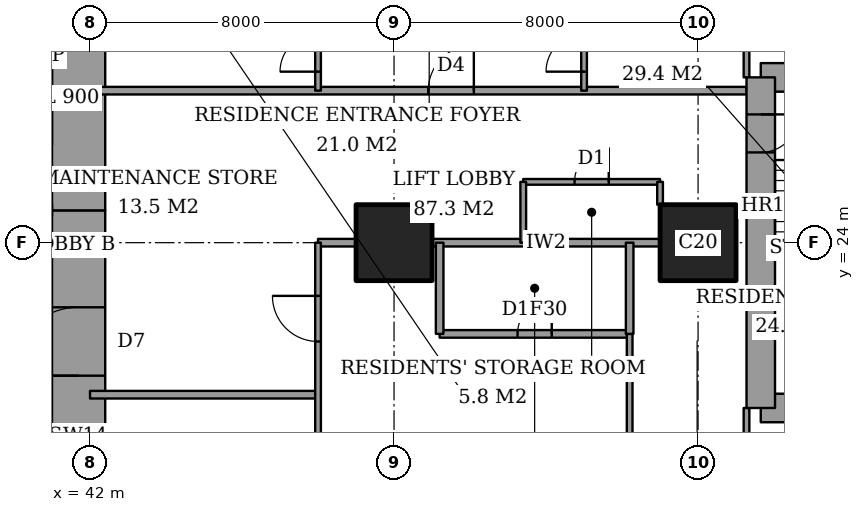
"""IFC4 building model, lengths in metres.
Left out: names, types, materials, properties, quantities, classifications, styles, units other than length and angle.
Written with IfcOpenShell. Run it as: python <this file> out.ifc"""

import sys

from ifc_helpers import new_model, si_unit, direction, frame, frame_2d, origin, origin_2d, place, context, subcontext, project, spatial, rectangle, extrude, element, fill, save


model = new_model("IFC4")
c1 = context("Model", 3, precision=1e-05, world=origin(), true_north=direction((0.0, 1.0)))
c2 = subcontext(c1, "Body", "Model", "MODEL_VIEW")
j1 = project(units=[si_unit("LENGTHUNIT", "METRE"), si_unit("PLANEANGLEUNIT", "RADIAN")], contexts=[c1])
p1 = place(None, origin())
s1 = spatial("IfcSite", under=j1, at=p1, CompositionType="ELEMENT")
p2 = place(p1, origin())
s2 = spatial("IfcBuilding", under=s1, at=p2, CompositionType="ELEMENT")
p3 = place(p2, frame((0.0, 0.0, 29.6)))
s3 = spatial("IfcBuildingStorey", under=s2, at=p3, CompositionType="ELEMENT", Elevation=29.6)
for number, where, z_axis, x_axis in (
    (1, (50.0, 24.0, 0.0), (0.0, 0.0, 1.0), (1.0, 0.0, 0.0)),
    (2, (58.0, 24.0, 0.0), (0.0, 0.0, 1.0), (1.0, 0.0, 0.0)),
):
    element("IfcColumn", number, at=place(p3, frame(where, z_axis=z_axis, x_axis=x_axis)), inside=s3, PredefinedType="COLUMN", context=c2, shape_type="SweptSolid", body=[
        extrude(rectangle(XDim=2.0, YDim=2.0, at=origin_2d()), origin(), (0.0, 0.0, 1.0), 3.6),
    ])
p4 = place(p3, frame((41.7, 13.0, 0.0), z_axis=(0.0, 0.0, 1.0), x_axis=(0.0, 1.0, 0.0)))
e3 = element("IfcWall", 3, at=p4, inside=s3, PredefinedType="SHEAR", context=c2, shape_type="SweptSolid", body=[
    extrude(rectangle(XDim=11.85, YDim=1.4, at=frame_2d((5.925, 0.0))), origin(), (0.0, 0.0, 1.0), 3.6),
])
p5 = place(p4, frame((7.5, 0.0, 0.0)))
e4 = element("IfcOpeningElement", 4, at=p5, cuts=e3, PredefinedType="OPENING", context=c2, shape_type="SweptSolid", body=[
    extrude(rectangle(XDim=1.8, YDim=2.4, at=frame_2d((0.9, 1.2))), frame((0.0, 0.71, 0.0), z_axis=(0.0, -1.0, 0.0), x_axis=(1.0, 0.0, 0.0)), (0.0, 0.0, 1.0), 1.42),
])
p6 = place(p3, frame((41.7, 24.85, 0.0), z_axis=(0.0, 0.0, 1.0), x_axis=(0.0, 1.0, 0.0)))
e5 = element("IfcWall", 5, at=p6, inside=s3, PredefinedType="SHEAR", context=c2, shape_type="SweptSolid", body=[
    extrude(rectangle(XDim=10.15, YDim=1.4, at=frame_2d((5.075, 0.0))), origin(), (0.0, 0.0, 1.0), 3.6),
])
for number, where, z_axis, x_axis in (
    (6, (59.65, 19.65, 0.0), (0.0, 0.0, 1.0), (1.0, 0.0, 0.0)),
    (7, (64.1, 28.35, 0.0), (0.0, 0.0, 1.0), (-1.0, 0.0, 0.0)),
):
    element("IfcWall", number, at=place(p3, frame(where, z_axis=z_axis, x_axis=x_axis)), inside=s3, PredefinedType="SHEAR", context=c2, shape_type="SweptSolid", body=[
        extrude(rectangle(XDim=4.45, YDim=0.75, at=frame_2d((2.225, 0.0))), origin(), (0.0, 0.0, 1.0), 3.6),
    ])
p7 = place(p3, frame((59.65, 28.35, 0.0), z_axis=(0.0, 0.0, 1.0), x_axis=(0.0, -1.0, 0.0)))
e8 = element("IfcWall", 8, at=p7, inside=s3, PredefinedType="SHEAR", context=c2, shape_type="SweptSolid", body=[
    extrude(rectangle(XDim=8.7, YDim=0.75, at=frame_2d((4.35, 0.0))), origin(), (0.0, 0.0, 1.0), 3.6),
])
p8 = place(p7, frame((0.975, 0.0, 0.0)))
e9 = element("IfcOpeningElement", 9, at=p8, cuts=e8, PredefinedType="OPENING", context=c2, shape_type="SweptSolid", body=[
    extrude(rectangle(XDim=1.0, YDim=2.1, at=frame_2d((0.5, 1.05))), frame((0.0, 0.385, 0.0), z_axis=(0.0, -1.0, 0.0), x_axis=(1.0, 0.0, 0.0)), (0.0, 0.0, 1.0), 0.77),
])
p9 = place(p3, frame((42.0, 20.0, 0.0), z_axis=(0.0, 0.0, 1.0), x_axis=(1.0, 0.0, 0.0)))
e10 = element("IfcWall", 10, at=p9, inside=s3, PredefinedType="PARTITIONING", context=c2, shape_type="SweptSolid", body=[
    extrude(rectangle(XDim=6.0, YDim=0.2, at=frame_2d((3.0, 0.0))), origin(), (0.0, 0.0, 1.0), 3.35),
])
p10 = place(p3, frame((51.2, 21.6, 0.0), z_axis=(0.0, 0.0, 1.0), x_axis=(1.0, 0.0, 0.0)))
e11 = element("IfcWall", 11, at=p10, inside=s3, PredefinedType="PARTITIONING", context=c2, shape_type="SweptSolid", body=[
    extrude(rectangle(XDim=5.0, YDim=0.2, at=frame_2d((2.5, 0.0))), origin(), (0.0, 0.0, 1.0), 3.35),
])
p11 = place(p10, frame((2.05, 0.0, 0.0)))
e12 = element("IfcOpeningElement", 12, at=p11, cuts=e11, PredefinedType="OPENING", context=c2, shape_type="SweptSolid", body=[
    extrude(rectangle(XDim=0.9, YDim=2.1, at=frame_2d((0.45, 1.05))), frame((0.0, 0.11, 0.0), z_axis=(0.0, -1.0, 0.0), x_axis=(1.0, 0.0, 0.0)), (0.0, 0.0, 1.0), 0.22),
])
p12 = place(p3, frame((48.0, 24.0, 0.0), z_axis=(0.0, 0.0, 1.0), x_axis=(1.0, 0.0, 0.0)))
e13 = element("IfcWall", 13, at=p12, inside=s3, PredefinedType="PARTITIONING", context=c2, shape_type="SweptSolid", body=[
    extrude(rectangle(XDim=1.0, YDim=0.2, at=frame_2d((0.5, 0.0))), origin(), (0.0, 0.0, 1.0), 3.35),
])
p13 = place(p3, frame((51.0, 24.0, 0.0), z_axis=(0.0, 0.0, 1.0), x_axis=(1.0, 0.0, 0.0)))
e14 = element("IfcWall", 14, at=p13, inside=s3, PredefinedType="PARTITIONING", context=c2, shape_type="SweptSolid", body=[
    extrude(rectangle(XDim=6.0, YDim=0.2, at=frame_2d((3.0, 0.0))), origin(), (0.0, 0.0, 1.0), 3.35),
])
p14 = place(p3, frame((53.4, 25.6, 0.0), z_axis=(0.0, 0.0, 1.0), x_axis=(1.0, 0.0, 0.0)))
e15 = element("IfcWall", 15, at=p14, inside=s3, PredefinedType="PARTITIONING", context=c2, shape_type="SweptSolid", body=[
    extrude(rectangle(XDim=3.6, YDim=0.15, at=frame_2d((1.8, 0.0))), origin(), (0.0, 0.0, 1.0), 3.35),
])
p15 = place(p14, frame((1.35, 0.0, 0.0)))
e16 = element("IfcOpeningElement", 16, at=p15, cuts=e15, PredefinedType="OPENING", context=c2, shape_type="SweptSolid", body=[
    extrude(rectangle(XDim=0.9, YDim=2.1, at=frame_2d((0.45, 1.05))), frame((0.0, 0.085, 0.0), z_axis=(0.0, -1.0, 0.0), x_axis=(1.0, 0.0, 0.0)), (0.0, 0.0, 1.0), 0.17),
])
p16 = place(p3, frame((42.0, 28.0, 0.0), z_axis=(0.0, 0.0, 1.0), x_axis=(1.0, 0.0, 0.0)))
e17 = element("IfcWall", 17, at=p16, inside=s3, PredefinedType="PARTITIONING", context=c2, shape_type="SweptSolid", body=[
    extrude(rectangle(XDim=17.275, YDim=0.2, at=frame_2d((8.637, 0.0))), origin(), (0.0, 0.0, 1.0), 3.35),
])
p17 = place(p16, frame((8.9, 0.0, 0.0)))
e18 = element("IfcOpeningElement", 18, at=p17, cuts=e17, PredefinedType="OPENING", context=c2, shape_type="SweptSolid", body=[
    extrude(rectangle(XDim=1.2, YDim=2.4, at=frame_2d((0.6, 1.2))), frame((0.0, 0.11, 0.0), z_axis=(0.0, -1.0, 0.0), x_axis=(1.0, 0.0, 0.0)), (0.0, 0.0, 1.0), 0.22),
])
p18 = place(p3, frame((48.0, 10.6, 0.0), z_axis=(0.0, 0.0, 1.0), x_axis=(0.0, 1.0, 0.0)))
e19 = element("IfcWall", 19, at=p18, inside=s3, PredefinedType="PARTITIONING", context=c2, shape_type="SweptSolid", body=[
    extrude(rectangle(XDim=13.4, YDim=0.15, at=frame_2d((6.7, 0.0))), origin(), (0.0, 0.0, 1.0), 3.35),
])
p19 = place(p18, frame((10.8, 0.0, 0.0)))
e20 = element("IfcOpeningElement", 20, at=p19, cuts=e19, PredefinedType="OPENING", context=c2, shape_type="SweptSolid", body=[
    extrude(rectangle(XDim=1.2, YDim=2.4, at=frame_2d((0.6, 1.2))), frame((0.0, 0.085, 0.0), z_axis=(0.0, -1.0, 0.0), x_axis=(1.0, 0.0, 0.0)), (0.0, 0.0, 1.0), 0.17),
])
p20 = place(p18, frame((6.7, 0.0, 0.0)))
e21 = element("IfcOpeningElement", 21, at=p20, cuts=e19, PredefinedType="OPENING", context=c2, shape_type="SweptSolid", body=[
    extrude(rectangle(XDim=0.9, YDim=2.1, at=frame_2d((0.45, 1.05))), frame((0.0, 0.085, 0.0), z_axis=(0.0, -1.0, 0.0), x_axis=(1.0, 0.0, 0.0)), (0.0, 0.0, 1.0), 0.17),
])
p21 = place(p3, frame((48.0, 28.0, 0.0), z_axis=(0.0, 0.0, 1.0), x_axis=(0.0, 1.0, 0.0)))
e22 = element("IfcWall", 22, at=p21, inside=s3, PredefinedType="PARTITIONING", context=c2, shape_type="SweptSolid", body=[
    extrude(rectangle(XDim=9.4, YDim=0.15, at=frame_2d((4.7, 0.0))), origin(), (0.0, 0.0, 1.0), 3.35),
])
p22 = place(p21, frame((0.5, 0.0, 0.0)))
e23 = element("IfcOpeningElement", 23, at=p22, cuts=e22, PredefinedType="OPENING", context=c2, shape_type="SweptSolid", body=[
    extrude(rectangle(XDim=1.0, YDim=2.1, at=frame_2d((0.5, 1.05))), frame((0.0, 0.085, 0.0), z_axis=(0.0, -1.0, 0.0), x_axis=(1.0, 0.0, 0.0)), (0.0, 0.0, 1.0), 0.17),
])
p23 = place(p3, frame((51.2, 21.6, 0.0), z_axis=(0.0, 0.0, 1.0), x_axis=(0.0, 1.0, 0.0)))
e24 = element("IfcWall", 24, at=p23, inside=s3, PredefinedType="PARTITIONING", context=c2, shape_type="SweptSolid", body=[
    extrude(rectangle(XDim=2.4, YDim=0.2, at=frame_2d((1.2, 0.0))), origin(), (0.0, 0.0, 1.0), 3.35),
])
p24 = place(p3, frame((53.4, 24.0, 0.0), z_axis=(0.0, 0.0, 1.0), x_axis=(0.0, 1.0, 0.0)))
e25 = element("IfcWall", 25, at=p24, inside=s3, PredefinedType="PARTITIONING", context=c2, shape_type="SweptSolid", body=[
    extrude(rectangle(XDim=1.6, YDim=0.15, at=frame_2d((0.8, 0.0))), origin(), (0.0, 0.0, 1.0), 3.35),
])
p25 = place(p3, frame((55.0, 28.0, 0.0), z_axis=(0.0, 0.0, 1.0), x_axis=(0.0, 1.0, 0.0)))
e26 = element("IfcWall", 26, at=p25, inside=s3, PredefinedType="PARTITIONING", context=c2, shape_type="SweptSolid", body=[
    extrude(rectangle(XDim=9.4, YDim=0.15, at=frame_2d((4.7, 0.0))), origin(), (0.0, 0.0, 1.0), 3.35),
])
p26 = place(p25, frame((0.5, 0.0, 0.0)))
e27 = element("IfcOpeningElement", 27, at=p26, cuts=e26, PredefinedType="OPENING", context=c2, shape_type="SweptSolid", body=[
    extrude(rectangle(XDim=1.0, YDim=2.1, at=frame_2d((0.5, 1.05))), frame((0.0, 0.085, 0.0), z_axis=(0.0, -1.0, 0.0), x_axis=(1.0, 0.0, 0.0)), (0.0, 0.0, 1.0), 0.17),
])
p27 = place(p3, frame((56.2, 21.6, 0.0), z_axis=(0.0, 0.0, 1.0), x_axis=(0.0, 1.0, 0.0)))
e28 = element("IfcWall", 28, at=p27, inside=s3, PredefinedType="PARTITIONING", context=c2, shape_type="SweptSolid", body=[
    extrude(rectangle(XDim=2.4, YDim=0.2, at=frame_2d((1.2, 0.0))), origin(), (0.0, 0.0, 1.0), 3.35),
])
p28 = place(p3, frame((56.2, 10.6, 0.0), z_axis=(0.0, 0.0, 1.0), x_axis=(0.0, 1.0, 0.0)))
e29 = element("IfcWall", 29, at=p28, inside=s3, PredefinedType="PARTITIONING", context=c2, shape_type="SweptSolid", body=[
    extrude(rectangle(XDim=11.0, YDim=0.15, at=frame_2d((5.5, 0.0))), origin(), (0.0, 0.0, 1.0), 3.35),
])
p29 = place(p28, frame((7.0, 0.0, 0.0)))
e30 = element("IfcOpeningElement", 30, at=p29, cuts=e29, PredefinedType="OPENING", context=c2, shape_type="SweptSolid", body=[
    extrude(rectangle(XDim=1.0, YDim=2.1, at=frame_2d((0.5, 1.05))), frame((0.0, 0.085, 0.0), z_axis=(0.0, -1.0, 0.0), x_axis=(1.0, 0.0, 0.0)), (0.0, 0.0, 1.0), 0.17),
])
p30 = place(p3, frame((57.0, 25.0, 0.0), z_axis=(0.0, 0.0, 1.0), x_axis=(0.0, 1.0, 0.0)))
e31 = element("IfcWall", 31, at=p30, inside=s3, PredefinedType="PARTITIONING", context=c2, shape_type="SweptSolid", body=[
    extrude(rectangle(XDim=0.6, YDim=0.15, at=frame_2d((0.3, 0.0))), origin(), (0.0, 0.0, 1.0), 3.35),
])
p31 = place(p3, frame((59.275, 17.2, 0.0), z_axis=(0.0, 0.0, 1.0), x_axis=(0.0, 1.0, 0.0)))
e32 = element("IfcWall", 32, at=p31, inside=s3, PredefinedType="PARTITIONING", context=c2, shape_type="SweptSolid", body=[
    extrude(rectangle(XDim=2.45, YDim=0.15, at=frame_2d((1.225, 0.0))), origin(), (0.0, 0.0, 1.0), 3.35),
])
p32 = place(p31, frame((0.538, 0.0, 0.0)))
e33 = element("IfcOpeningElement", 33, at=p32, cuts=e32, PredefinedType="OPENING", context=c2, shape_type="SweptSolid", body=[
    extrude(rectangle(XDim=1.0, YDim=2.1, at=frame_2d((0.5, 1.05))), frame((0.0, 0.085, 0.0), z_axis=(0.0, -1.0, 0.0), x_axis=(1.0, 0.0, 0.0)), (0.0, 0.0, 1.0), 0.17),
])
p33 = place(p3, frame((59.275, 28.35, 0.0), z_axis=(0.0, 0.0, 1.0), x_axis=(0.0, 1.0, 0.0)))
e34 = element("IfcWall", 34, at=p33, inside=s3, PredefinedType="PARTITIONING", context=c2, shape_type="SweptSolid", body=[
    extrude(rectangle(XDim=2.45, YDim=0.15, at=frame_2d((1.225, 0.0))), origin(), (0.0, 0.0, 1.0), 3.35),
])
p34 = place(p33, frame((0.913, 0.0, 0.0)))
e35 = element("IfcOpeningElement", 35, at=p34, cuts=e34, PredefinedType="OPENING", context=c2, shape_type="SweptSolid", body=[
    extrude(rectangle(XDim=1.0, YDim=2.1, at=frame_2d((0.5, 1.05))), frame((0.0, 0.085, 0.0), z_axis=(0.0, -1.0, 0.0), x_axis=(1.0, 0.0, 0.0)), (0.0, 0.0, 1.0), 0.17),
])
p35 = place(p11, origin())
e36 = element("IfcDoor", 36, at=p35, inside=s3, OperationType="SINGLE_SWING_LEFT", PredefinedType="DOOR", context=c2, shape_type="SweptSolid", body=[
    extrude(rectangle(XDim=0.9, YDim=2.1, at=frame_2d((0.45, 1.05))), frame((0.0, 0.025, 0.0), z_axis=(0.0, -1.0, 0.0), x_axis=(1.0, 0.0, 0.0)), (0.0, 0.0, 1.0), 0.05),
])
fill(e12, e36)
p36 = place(p19, origin())
e37 = element("IfcDoor", 37, at=p36, inside=s3, OperationType="SINGLE_SWING_LEFT", PredefinedType="DOOR", context=c2, shape_type="SweptSolid", body=[
    extrude(rectangle(XDim=1.2, YDim=2.4, at=frame_2d((0.6, 1.2))), frame((0.0, 0.025, 0.0), z_axis=(0.0, -1.0, 0.0), x_axis=(1.0, 0.0, 0.0)), (0.0, 0.0, 1.0), 0.05),
])
fill(e20, e37)
p37 = place(p26, origin())
e38 = element("IfcDoor", 38, at=p37, inside=s3, OperationType="SINGLE_SWING_RIGHT", PredefinedType="DOOR", context=c2, shape_type="SweptSolid", body=[
    extrude(rectangle(XDim=1.0, YDim=2.1, at=frame_2d((0.5, 1.05))), frame((0.0, 0.025, 0.0), z_axis=(0.0, -1.0, 0.0), x_axis=(1.0, 0.0, 0.0)), (0.0, 0.0, 1.0), 0.05),
])
fill(e27, e38)
p38 = place(p17, origin())
e39 = element("IfcDoor", 39, at=p38, inside=s3, OperationType="SINGLE_SWING_LEFT", PredefinedType="DOOR", context=c2, shape_type="SweptSolid", body=[
    extrude(rectangle(XDim=1.2, YDim=2.4, at=frame_2d((0.6, 1.2))), frame((0.0, 0.025, 0.0), z_axis=(0.0, -1.0, 0.0), x_axis=(1.0, 0.0, 0.0)), (0.0, 0.0, 1.0), 0.05),
])
fill(e18, e39)
p39 = place(p22, origin())
e40 = element("IfcDoor", 40, at=p39, inside=s3, OperationType="SINGLE_SWING_RIGHT", PredefinedType="DOOR", context=c2, shape_type="SweptSolid", body=[
    extrude(rectangle(XDim=1.0, YDim=2.1, at=frame_2d((0.5, 1.05))), frame((0.0, 0.025, 0.0), z_axis=(0.0, -1.0, 0.0), x_axis=(1.0, 0.0, 0.0)), (0.0, 0.0, 1.0), 0.05),
])
fill(e23, e40)
p40 = place(p15, origin())
e41 = element("IfcDoor", 41, at=p40, inside=s3, OperationType="SINGLE_SWING_LEFT", PredefinedType="DOOR", context=c2, shape_type="SweptSolid", body=[
    extrude(rectangle(XDim=0.9, YDim=2.1, at=frame_2d((0.45, 1.05))), frame((0.0, 0.025, 0.0), z_axis=(0.0, -1.0, 0.0), x_axis=(1.0, 0.0, 0.0)), (0.0, 0.0, 1.0), 0.05),
])
fill(e16, e41)
p41 = place(p5, origin())
e42 = element("IfcDoor", 42, at=p41, inside=s3, OperationType="DOUBLE_DOOR_DOUBLE_SWING", PredefinedType="DOOR", context=c2, shape_type="SweptSolid", body=[
    extrude(rectangle(XDim=1.8, YDim=2.4, at=frame_2d((0.9, 1.2))), frame((0.0, 0.025, 0.0), z_axis=(0.0, -1.0, 0.0), x_axis=(1.0, 0.0, 0.0)), (0.0, 0.0, 1.0), 0.05),
])
fill(e4, e42)
p42 = place(p8, origin())
e43 = element("IfcDoor", 43, at=p42, inside=s3, OperationType="SINGLE_SWING_RIGHT", PredefinedType="DOOR", context=c2, shape_type="SweptSolid", body=[
    extrude(rectangle(XDim=1.0, YDim=2.1, at=frame_2d((0.5, 1.05))), frame((0.0, 0.025, 0.0), z_axis=(0.0, -1.0, 0.0), x_axis=(1.0, 0.0, 0.0)), (0.0, 0.0, 1.0), 0.05),
])
fill(e9, e43)
save(model, sys.argv[1])
